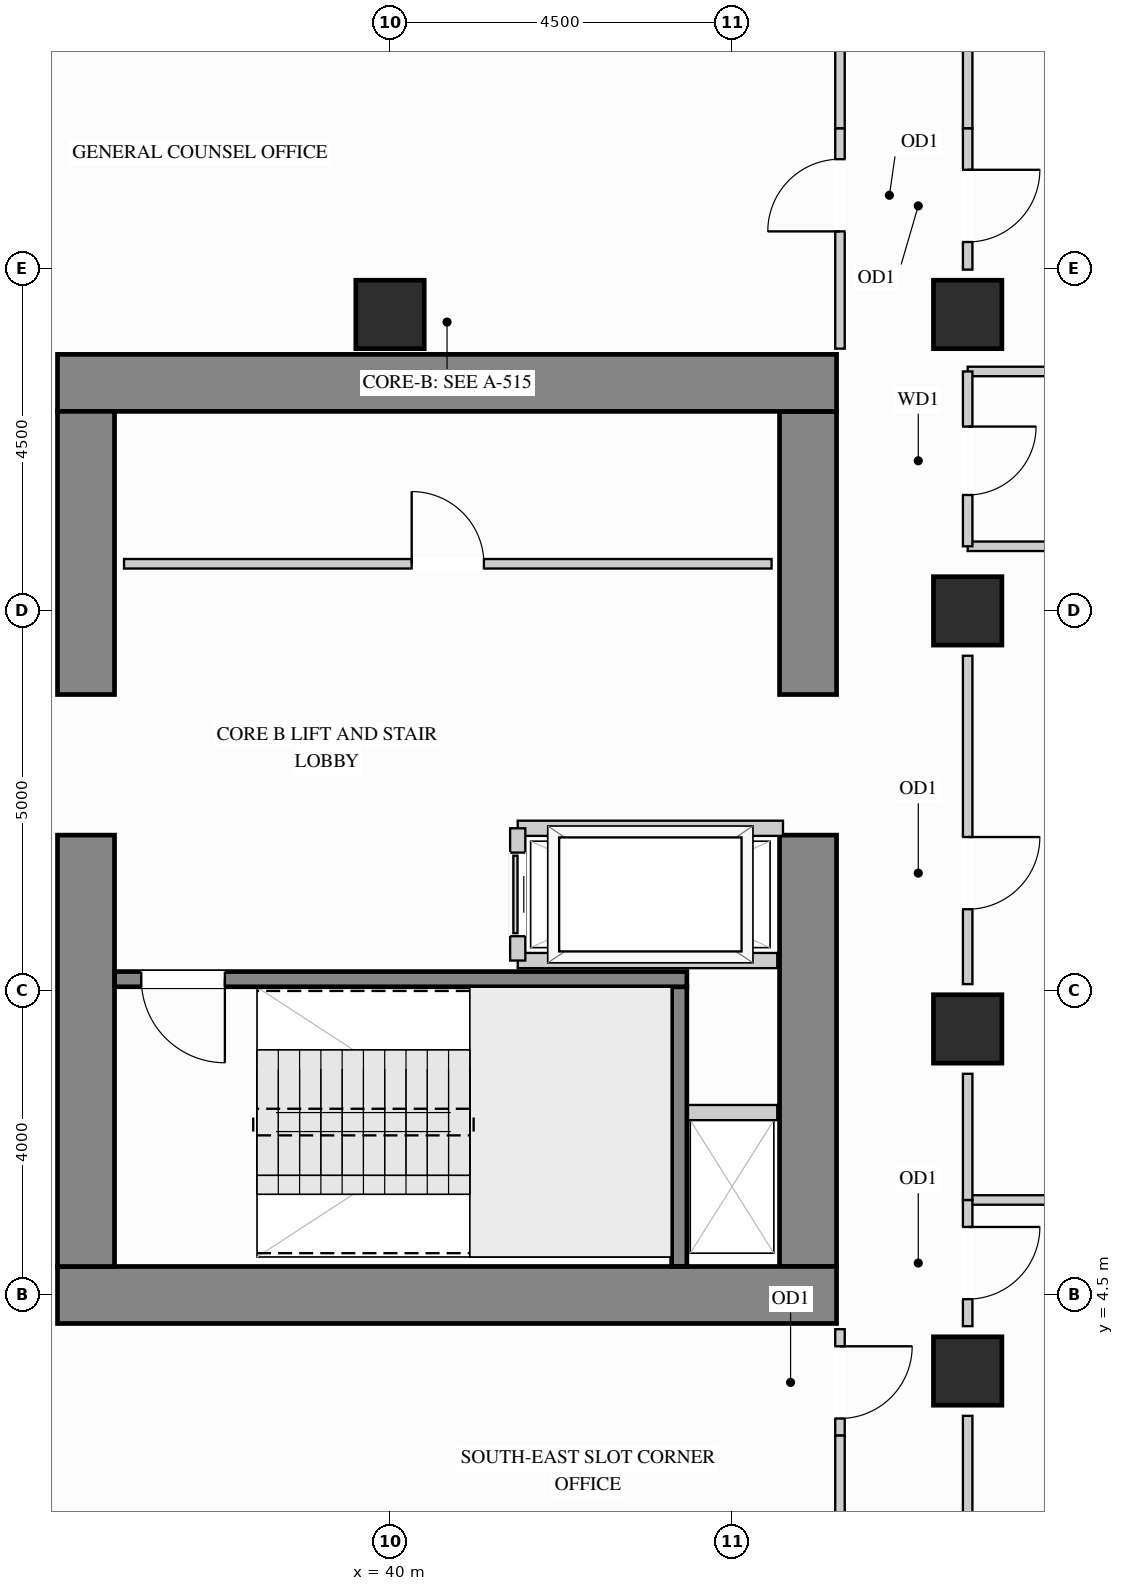
"""IFC4 building model, lengths in metres.
Left out: names, types, materials, properties, quantities, classifications, styles, units other than length and angle.
Written with IfcOpenShell. Run it as: python <this file> out.ifc"""

import sys

from ifc_helpers import new_model, si_unit, direction, frame, frame_2d, origin, origin_2d, place, context, subcontext, project, spatial, rectangle, extrude, source, transform, mapped, element, fill, save


model = new_model("IFC4")
c1 = context("Model", 3, precision=1e-05, world=origin(), true_north=direction((0.0, 1.0)))
c2 = subcontext(c1, "Body", "Model", "MODEL_VIEW")
j1 = project(units=[si_unit("LENGTHUNIT", "METRE"), si_unit("PLANEANGLEUNIT", "RADIAN")], contexts=[c1])
p1 = place(None, origin())
s1 = spatial("IfcSite", under=j1, at=p1, CompositionType="ELEMENT")
p2 = place(p1, origin())
s2 = spatial("IfcBuilding", under=s1, at=p2, CompositionType="ELEMENT")
p3 = place(p2, frame((0.0, 0.0, 113.4)))
s3 = spatial("IfcBuildingStorey", under=s2, at=p3, CompositionType="ELEMENT", Elevation=113.4)
m1 = source(origin(), c2, "Body", "SweptSolid", [
    extrude(rectangle(XDim=0.9, YDim=0.9, at=origin_2d()), origin(), (0.0, 0.0, 1.0), 3.38),
])
for number, where, z_axis, x_axis in (
    (1, (47.6, 13.5, 0.0), (0.0, 0.0, 1.0), (1.0, 0.0, 0.0)),
    (2, (47.6, 3.5, 0.0), (0.0, 0.0, 1.0), (1.0, 0.0, 0.0)),
    (3, (47.6, 8.0, 0.0), (0.0, 0.0, 1.0), (1.0, 0.0, 0.0)),
    (4, (40.0, 17.4, 0.0), (0.0, 0.0, 1.0), (1.0, 0.0, 0.0)),
    (5, (47.6, 17.4, 0.0), (0.0, 0.0, 1.0), (1.0, 0.0, 0.0)),
):
    element("IfcColumn", number, at=place(p3, frame(where, z_axis=z_axis, x_axis=x_axis)), inside=s3, PredefinedType="COLUMN", context=c2, shape_type="MappedRepresentation", body=[
        mapped(m1, transform((0.0, 0.0, 0.0), x_axis=(1.0, 0.0, 0.0), y_axis=(0.0, 1.0, 0.0), z_axis=(0.0, 0.0, 1.0))),
    ])
m2 = source(origin(), c2, "Body", "SweptSolid", [
    extrude(rectangle(XDim=5.675, YDim=0.75, at=frame_2d((2.837, 0.0))), origin(), (0.0, 0.0, 1.0), 3.38),
])
p4 = place(p3, frame((45.5, 4.875, 0.0), z_axis=(0.0, 0.0, 1.0), x_axis=(0.0, 1.0, 0.0)))
e6 = element("IfcWall", 6, at=p4, inside=s3, PredefinedType="SHEAR", context=c2, shape_type="MappedRepresentation", body=[
    mapped(m2, transform((0.0, 0.0, 0.0), x_axis=(1.0, 0.0, 0.0), y_axis=(0.0, 1.0, 0.0), z_axis=(0.0, 0.0, 1.0))),
])
m3 = source(origin(), c2, "Body", "SweptSolid", [
    extrude(rectangle(XDim=3.725, YDim=0.75, at=frame_2d((1.863, 0.0))), origin(), (0.0, 0.0, 1.0), 3.38),
])
p5 = place(p3, frame((45.5, 12.4, 0.0), z_axis=(0.0, 0.0, 1.0), x_axis=(0.0, 1.0, 0.0)))
e7 = element("IfcWall", 7, at=p5, inside=s3, PredefinedType="SHEAR", context=c2, shape_type="MappedRepresentation", body=[
    mapped(m3, transform((0.0, 0.0, 0.0), x_axis=(1.0, 0.0, 0.0), y_axis=(0.0, 1.0, 0.0), z_axis=(0.0, 0.0, 1.0))),
])
m4 = source(origin(), c2, "Body", "SweptSolid", [
    extrude(rectangle(XDim=10.25, YDim=0.75, at=frame_2d((5.125, 0.0))), origin(), (0.0, 0.0, 1.0), 3.38),
])
for number, where, z_axis, x_axis in (
    (8, (35.625, 16.5, 0.0), (0.0, 0.0, 1.0), (1.0, 0.0, 0.0)),
    (9, (35.625, 4.5, 0.0), (0.0, 0.0, 1.0), (1.0, 0.0, 0.0)),
):
    element("IfcWall", number, at=place(p3, frame(where, z_axis=z_axis, x_axis=x_axis)), inside=s3, PredefinedType="SHEAR", context=c2, shape_type="MappedRepresentation", body=[
        mapped(m4, transform((0.0, 0.0, 0.0), x_axis=(1.0, 0.0, 0.0), y_axis=(0.0, 1.0, 0.0), z_axis=(0.0, 0.0, 1.0))),
    ])
p6 = place(p3, frame((36.0, 4.875, 0.0), z_axis=(0.0, 0.0, 1.0), x_axis=(0.0, 1.0, 0.0)))
e10 = element("IfcWall", 10, at=p6, inside=s3, PredefinedType="SHEAR", context=c2, shape_type="MappedRepresentation", body=[
    mapped(m2, transform((0.0, 0.0, 0.0), x_axis=(1.0, 0.0, 0.0), y_axis=(0.0, 1.0, 0.0), z_axis=(0.0, 0.0, 1.0))),
])
p7 = place(p3, frame((36.0, 12.4, 0.0), z_axis=(0.0, 0.0, 1.0), x_axis=(0.0, 1.0, 0.0)))
e11 = element("IfcWall", 11, at=p7, inside=s3, PredefinedType="SHEAR", context=c2, shape_type="MappedRepresentation", body=[
    mapped(m3, transform((0.0, 0.0, 0.0), x_axis=(1.0, 0.0, 0.0), y_axis=(0.0, 1.0, 0.0), z_axis=(0.0, 0.0, 1.0))),
])
p8 = place(p3, frame((36.5, 14.12, 0.0), z_axis=(0.0, 0.0, 1.0), x_axis=(1.0, 0.0, 0.0)))
e12 = element("IfcWall", 12, at=p8, inside=s3, PredefinedType="PARTITIONING", context=c2, shape_type="SweptSolid", body=[
    extrude(rectangle(XDim=8.52, YDim=0.125, at=frame_2d((4.26, 0.0))), origin(), (0.0, 0.0, 1.0), 3.365),
])
p9 = place(p8, frame((3.785, 0.0, 0.0)))
e13 = element("IfcOpeningElement", 13, at=p9, cuts=e12, PredefinedType="OPENING", context=c2, shape_type="SweptSolid", body=[
    extrude(rectangle(XDim=0.95, YDim=2.15, at=frame_2d((0.475, 1.075))), frame((0.0, 0.073, 0.0), z_axis=(0.0, -1.0, 0.0), x_axis=(1.0, 0.0, 0.0)), (0.0, 0.0, 1.0), 0.145),
])
m5 = source(origin(), c2, "Body", "SweptSolid", [
    extrude(rectangle(XDim=8.048, YDim=0.125, at=frame_2d((4.024, 0.0))), origin(), (0.0, 0.0, 1.0), 3.365),
])
p10 = place(p3, frame((47.6, 14.35, 0.0), z_axis=(0.0, 0.0, 1.0), x_axis=(1.0, 0.0, 0.0)))
e14 = element("IfcWall", 14, at=p10, inside=s3, PredefinedType="PARTITIONING", context=c2, shape_type="MappedRepresentation", body=[
    mapped(m5, transform((0.0, 0.0, 0.0), x_axis=(1.0, 0.0, 0.0), y_axis=(0.0, 1.0, 0.0), z_axis=(0.0, 0.0, 1.0))),
])
m6 = source(origin(), c2, "Body", "SweptSolid", [
    extrude(rectangle(XDim=8.048, YDim=0.125, at=frame_2d((4.024, 0.0))), origin(), (0.0, 0.0, 1.0), 2.677),
])
p11 = place(p3, frame((47.6, 16.65, 0.0), z_axis=(0.0, 0.0, 1.0), x_axis=(1.0, 0.0, 0.0)))
e15 = element("IfcWall", 15, at=p11, inside=s3, PredefinedType="PARTITIONING", context=c2, shape_type="MappedRepresentation", body=[
    mapped(m6, transform((0.0, 0.0, 0.0), x_axis=(1.0, 0.0, 0.0), y_axis=(0.0, 1.0, 0.0), z_axis=(0.0, 0.0, 1.0))),
])
p12 = place(p3, frame((47.6, 5.75, 0.0), z_axis=(0.0, 0.0, 1.0), x_axis=(1.0, 0.0, 0.0)))
e16 = element("IfcWall", 16, at=p12, inside=s3, PredefinedType="PARTITIONING", context=c2, shape_type="MappedRepresentation", body=[
    mapped(m5, transform((0.0, 0.0, 0.0), x_axis=(1.0, 0.0, 0.0), y_axis=(0.0, 1.0, 0.0), z_axis=(0.0, 0.0, 1.0))),
])
p13 = place(p3, frame((47.6, 4.09, 0.0), z_axis=(0.0, 0.0, 1.0), x_axis=(0.0, 1.0, 0.0)))
e17 = element("IfcWall", 17, at=p13, inside=s3, PredefinedType="PARTITIONING", context=c2, shape_type="SweptSolid", body=[
    extrude(rectangle(XDim=1.66, YDim=0.125, at=frame_2d((0.83, 0.0))), origin(), (0.0, 0.0, 1.0), 2.677),
])
p14 = place(p13, frame((0.355, 0.0, 0.0)))
e18 = element("IfcOpeningElement", 18, at=p14, cuts=e17, PredefinedType="OPENING", context=c2, shape_type="SweptSolid", body=[
    extrude(rectangle(XDim=0.95, YDim=2.15, at=frame_2d((0.475, 1.075))), frame((0.0, 0.073, 0.0), z_axis=(0.0, -1.0, 0.0), x_axis=(1.0, 0.0, 0.0)), (0.0, 0.0, 1.0), 0.145),
])
m7 = source(origin(), c2, "Body", "SweptSolid", [
    extrude(rectangle(XDim=1.72, YDim=0.125, at=frame_2d((0.86, 0.0))), origin(), (0.0, 0.0, 1.0), 2.677),
])
p15 = place(p3, frame((47.6, 1.19, 0.0), z_axis=(0.0, 0.0, 1.0), x_axis=(0.0, 1.0, 0.0)))
e19 = element("IfcWall", 19, at=p15, inside=s3, PredefinedType="PARTITIONING", context=c2, shape_type="MappedRepresentation", body=[
    mapped(m7, transform((0.0, 0.0, 0.0), x_axis=(1.0, 0.0, 0.0), y_axis=(0.0, 1.0, 0.0), z_axis=(0.0, 0.0, 1.0))),
])
m8 = source(origin(), c2, "Body", "SweptSolid", [
    extrude(rectangle(XDim=1.66, YDim=0.125, at=frame_2d((0.83, 0.0))), origin(), (0.0, 0.0, 1.0), 2.677),
])
p16 = place(p3, frame((47.6, 5.75, 0.0), z_axis=(0.0, 0.0, 1.0), x_axis=(0.0, 1.0, 0.0)))
e20 = element("IfcWall", 20, at=p16, inside=s3, PredefinedType="PARTITIONING", context=c2, shape_type="MappedRepresentation", body=[
    mapped(m8, transform((0.0, 0.0, 0.0), x_axis=(1.0, 0.0, 0.0), y_axis=(0.0, 1.0, 0.0), z_axis=(0.0, 0.0, 1.0))),
])
p17 = place(p3, frame((47.6, 8.59, 0.0), z_axis=(0.0, 0.0, 1.0), x_axis=(0.0, 1.0, 0.0)))
e21 = element("IfcWall", 21, at=p17, inside=s3, PredefinedType="PARTITIONING", context=c2, shape_type="SweptSolid", body=[
    extrude(rectangle(XDim=4.32, YDim=0.125, at=frame_2d((2.16, 0.0))), origin(), (0.0, 0.0, 1.0), 2.677),
])
p18 = place(p17, frame((0.985, 0.0, 0.0)))
e22 = element("IfcOpeningElement", 22, at=p18, cuts=e21, PredefinedType="OPENING", context=c2, shape_type="SweptSolid", body=[
    extrude(rectangle(XDim=0.95, YDim=2.15, at=frame_2d((0.475, 1.075))), frame((0.0, 0.073, 0.0), z_axis=(0.0, -1.0, 0.0), x_axis=(1.0, 0.0, 0.0)), (0.0, 0.0, 1.0), 0.145),
])
p19 = place(p3, frame((47.6, 17.99, 0.0), z_axis=(0.0, 0.0, 1.0), x_axis=(0.0, 1.0, 0.0)))
e23 = element("IfcWall", 23, at=p19, inside=s3, PredefinedType="PARTITIONING", context=c2, shape_type="SweptSolid", body=[
    extrude(rectangle(XDim=1.86, YDim=0.125, at=frame_2d((0.93, 0.0))), origin(), (0.0, 0.0, 1.0), 2.677),
])
p20 = place(p19, frame((0.363, 0.0, 0.0)))
e24 = element("IfcOpeningElement", 24, at=p20, cuts=e23, PredefinedType="OPENING", context=c2, shape_type="SweptSolid", body=[
    extrude(rectangle(XDim=0.95, YDim=2.15, at=frame_2d((0.475, 1.075))), frame((0.0, 0.073, 0.0), z_axis=(0.0, -1.0, 0.0), x_axis=(1.0, 0.0, 0.0)), (0.0, 0.0, 1.0), 0.145),
])
m9 = source(origin(), c2, "Body", "SweptSolid", [
    extrude(rectangle(XDim=1.46, YDim=0.125, at=frame_2d((0.73, 0.0))), origin(), (0.0, 0.0, 1.0), 2.677),
])
p21 = place(p3, frame((47.6, 19.85, 0.0), z_axis=(0.0, 0.0, 1.0), x_axis=(0.0, 1.0, 0.0)))
e25 = element("IfcWall", 25, at=p21, inside=s3, PredefinedType="PARTITIONING", context=c2, shape_type="MappedRepresentation", body=[
    mapped(m9, transform((0.0, 0.0, 0.0), x_axis=(1.0, 0.0, 0.0), y_axis=(0.0, 1.0, 0.0), z_axis=(0.0, 0.0, 1.0))),
])
p22 = place(p3, frame((47.6, 14.35, 0.0), z_axis=(0.0, 0.0, 1.0), x_axis=(0.0, 1.0, 0.0)))
e26 = element("IfcWall", 26, at=p22, inside=s3, PredefinedType="PARTITIONING", context=c2, shape_type="SweptSolid", body=[
    extrude(rectangle(XDim=2.3, YDim=0.125, at=frame_2d((1.15, 0.0))), origin(), (0.0, 0.0, 1.0), 2.677),
])
p23 = place(p22, frame((0.675, 0.0, 0.0)))
e27 = element("IfcOpeningElement", 27, at=p23, cuts=e26, PredefinedType="OPENING", context=c2, shape_type="SweptSolid", body=[
    extrude(rectangle(XDim=0.9, YDim=2.15, at=frame_2d((0.45, 1.075))), frame((0.0, 0.073, 0.0), z_axis=(0.0, -1.0, 0.0), x_axis=(1.0, 0.0, 0.0)), (0.0, 0.0, 1.0), 0.145),
])
p24 = place(p3, frame((45.92, 16.95, 0.0), z_axis=(0.0, 0.0, 1.0), x_axis=(0.0, 1.0, 0.0)))
e28 = element("IfcWall", 28, at=p24, inside=s3, PredefinedType="PARTITIONING", context=c2, shape_type="SweptSolid", body=[
    extrude(rectangle(XDim=2.9, YDim=0.125, at=frame_2d((1.45, 0.0))), origin(), (0.0, 0.0, 1.0), 3.365),
])
p25 = place(p24, frame((1.543, 0.0, 0.0)))
e29 = element("IfcOpeningElement", 29, at=p25, cuts=e28, PredefinedType="OPENING", context=c2, shape_type="SweptSolid", body=[
    extrude(rectangle(XDim=0.95, YDim=2.15, at=frame_2d((0.475, 1.075))), frame((0.0, 0.073, 0.0), z_axis=(0.0, -1.0, 0.0), x_axis=(1.0, 0.0, 0.0)), (0.0, 0.0, 1.0), 0.145),
])
m10 = source(origin(), c2, "Body", "SweptSolid", [
    extrude(rectangle(XDim=2.298, YDim=0.125, at=frame_2d((1.149, 0.0))), origin(), (0.0, 0.0, 1.0), 3.365),
])
p26 = place(p3, frame((45.92, 19.85, 0.0), z_axis=(0.0, 0.0, 1.0), x_axis=(0.0, 1.0, 0.0)))
e30 = element("IfcWall", 30, at=p26, inside=s3, PredefinedType="PARTITIONING", context=c2, shape_type="MappedRepresentation", body=[
    mapped(m10, transform((0.0, 0.0, 0.0), x_axis=(1.0, 0.0, 0.0), y_axis=(0.0, 1.0, 0.0), z_axis=(0.0, 0.0, 1.0))),
])
p27 = place(p3, frame((45.92, 2.65, 0.0), z_axis=(0.0, 0.0, 1.0), x_axis=(0.0, 1.0, 0.0)))
e31 = element("IfcWall", 31, at=p27, inside=s3, PredefinedType="PARTITIONING", context=c2, shape_type="SweptSolid", body=[
    extrude(rectangle(XDim=1.4, YDim=0.125, at=frame_2d((0.7, 0.0))), origin(), (0.0, 0.0, 1.0), 3.365),
])
p28 = place(p27, frame((0.225, 0.0, 0.0)))
e32 = element("IfcOpeningElement", 32, at=p28, cuts=e31, PredefinedType="OPENING", context=c2, shape_type="SweptSolid", body=[
    extrude(rectangle(XDim=0.95, YDim=2.15, at=frame_2d((0.475, 1.075))), frame((0.0, 0.073, 0.0), z_axis=(0.0, -1.0, 0.0), x_axis=(1.0, 0.0, 0.0)), (0.0, 0.0, 1.0), 0.145),
])
p29 = place(p3, frame((45.92, 0.352, 0.0), z_axis=(0.0, 0.0, 1.0), x_axis=(0.0, 1.0, 0.0)))
e33 = element("IfcWall", 33, at=p29, inside=s3, PredefinedType="PARTITIONING", context=c2, shape_type="MappedRepresentation", body=[
    mapped(m10, transform((0.0, 0.0, 0.0), x_axis=(1.0, 0.0, 0.0), y_axis=(0.0, 1.0, 0.0), z_axis=(0.0, 0.0, 1.0))),
])
m11 = source(origin(), c2, "Body", "SweptSolid", [
    extrude(rectangle(XDim=1.245, YDim=0.2, at=frame_2d((0.623, 0.0))), origin(), (0.0, 0.0, 1.0), 3.365),
])
p30 = place(p3, frame((43.85, 6.9, 0.0), z_axis=(0.0, 0.0, 1.0), x_axis=(1.0, 0.0, 0.0)))
e34 = element("IfcWall", 34, at=p30, inside=s3, PredefinedType="PARTITIONING", context=c2, shape_type="MappedRepresentation", body=[
    mapped(m11, transform((0.0, 0.0, 0.0), x_axis=(1.0, 0.0, 0.0), y_axis=(0.0, 1.0, 0.0), z_axis=(0.0, 0.0, 1.0))),
])
m12 = source(origin(), c2, "Body", "SweptSolid", [
    extrude(rectangle(XDim=3.49, YDim=0.2, at=frame_2d((1.745, 0.0))), origin(), (0.0, 0.0, 1.0), 3.365),
])
p31 = place(p3, frame((41.68, 10.64, 0.0), z_axis=(0.0, 0.0, 1.0), x_axis=(1.0, 0.0, 0.0)))
e35 = element("IfcWall", 35, at=p31, inside=s3, PredefinedType="PARTITIONING", context=c2, shape_type="MappedRepresentation", body=[
    mapped(m12, transform((0.0, 0.0, 0.0), x_axis=(1.0, 0.0, 0.0), y_axis=(0.0, 1.0, 0.0), z_axis=(0.0, 0.0, 1.0))),
])
m13 = source(origin(), c2, "Body", "SweptSolid", [
    extrude(rectangle(XDim=3.415, YDim=0.2, at=frame_2d((1.708, 0.0))), origin(), (0.0, 0.0, 1.0), 3.365),
])
p32 = place(p3, frame((41.68, 8.9, 0.0), z_axis=(0.0, 0.0, 1.0), x_axis=(1.0, 0.0, 0.0)))
e36 = element("IfcWall", 36, at=p32, inside=s3, PredefinedType="PARTITIONING", context=c2, shape_type="MappedRepresentation", body=[
    mapped(m13, transform((0.0, 0.0, 0.0), x_axis=(1.0, 0.0, 0.0), y_axis=(0.0, 1.0, 0.0), z_axis=(0.0, 0.0, 1.0))),
])
p33 = place(p3, frame((41.68, 8.9, 0.0), z_axis=(0.0, 0.0, 1.0), x_axis=(0.0, 1.0, 0.0)))
e37 = element("IfcWall", 37, at=p33, inside=s3, PredefinedType="PARTITIONING", context=c2, shape_type="SweptSolid", body=[
    extrude(rectangle(XDim=1.74, YDim=0.2, at=frame_2d((0.87, 0.0))), origin(), (0.0, 0.0, 1.0), 3.365),
])
p34 = place(p33, frame((0.32, 0.0, 0.0)))
e38 = element("IfcOpeningElement", 38, at=p34, cuts=e37, PredefinedType="OPENING", context=c2, shape_type="SweptSolid", body=[
    extrude(rectangle(XDim=1.1, YDim=2.2, at=frame_2d((0.55, 1.1))), frame((0.0, 0.11, 0.0), z_axis=(0.0, -1.0, 0.0), x_axis=(1.0, 0.0, 0.0)), (0.0, 0.0, 1.0), 0.22),
])
m14 = source(origin(), c2, "Body", "SweptSolid", [
    extrude(rectangle(XDim=3.678, YDim=0.2, at=frame_2d((1.839, 0.0))), origin(), (0.0, 0.0, 1.0), 3.38),
])
p35 = place(p3, frame((43.805, 4.877, 0.0), z_axis=(0.0, 0.0, 1.0), x_axis=(0.0, 1.0, 0.0)))
e39 = element("IfcWall", 39, at=p35, inside=s3, PredefinedType="SHEAR", context=c2, shape_type="MappedRepresentation", body=[
    mapped(m14, transform((0.0, 0.0, 0.0), x_axis=(1.0, 0.0, 0.0), y_axis=(0.0, 1.0, 0.0), z_axis=(0.0, 0.0, 1.0))),
])
p36 = place(p3, frame((36.377, 8.655, 0.0), z_axis=(0.0, 0.0, 1.0), x_axis=(1.0, 0.0, 0.0)))
e40 = element("IfcWall", 40, at=p36, inside=s3, PredefinedType="SHEAR", context=c2, shape_type="SweptSolid", body=[
    extrude(rectangle(XDim=7.528, YDim=0.2, at=frame_2d((3.764, 0.0))), origin(), (0.0, 0.0, 1.0), 3.38),
])
p37 = place(p36, frame((0.35, 0.0, 0.0)))
e41 = element("IfcOpeningElement", 41, at=p37, cuts=e40, PredefinedType="OPENING", context=c2, shape_type="SweptSolid", body=[
    extrude(rectangle(XDim=1.1, YDim=2.15, at=frame_2d((0.55, 1.075))), frame((0.0, 0.11, 0.0), z_axis=(0.0, -1.0, 0.0), x_axis=(1.0, 0.0, 0.0)), (0.0, 0.0, 1.0), 0.22),
])
m15 = source(origin(), c2, "Body", "SweptSolid", [
    extrude(rectangle(XDim=1.1, YDim=2.2, at=frame_2d((0.55, 1.1))), frame((0.0, 0.025, 0.0), z_axis=(0.0, -1.0, 0.0), x_axis=(1.0, 0.0, 0.0)), (0.0, 0.0, 1.0), 0.05),
])
p38 = place(p34, origin())
e42 = element("IfcDoor", 42, at=p38, inside=s3, OperationType="SLIDING_TO_LEFT", PredefinedType="DOOR", context=c2, shape_type="MappedRepresentation", body=[
    mapped(m15, transform((0.0, 0.0, 0.0), x_axis=(1.0, 0.0, 0.0), y_axis=(0.0, 1.0, 0.0), z_axis=(0.0, 0.0, 1.0))),
])
fill(e38, e42)
m16 = source(origin(), c2, "Body", "SweptSolid", [
    extrude(rectangle(XDim=0.95, YDim=2.15, at=frame_2d((0.475, 1.075))), frame((0.0, 0.025, 0.0), z_axis=(0.0, -1.0, 0.0), x_axis=(1.0, 0.0, 0.0)), (0.0, 0.0, 1.0), 0.05),
])
p39 = place(p9, origin())
e43 = element("IfcDoor", 43, at=p39, inside=s3, OperationType="SINGLE_SWING_LEFT", PredefinedType="DOOR", context=c2, shape_type="MappedRepresentation", body=[
    mapped(m16, transform((0.0, 0.0, 0.0), x_axis=(1.0, 0.0, 0.0), y_axis=(0.0, 1.0, 0.0), z_axis=(0.0, 0.0, 1.0))),
])
fill(e13, e43)
p40 = place(p25, origin())
e44 = element("IfcDoor", 44, at=p40, inside=s3, OperationType="SINGLE_SWING_LEFT", PredefinedType="DOOR", context=c2, shape_type="MappedRepresentation", body=[
    mapped(m16, transform((0.0, 0.0, 0.0), x_axis=(1.0, 0.0, 0.0), y_axis=(0.0, 1.0, 0.0), z_axis=(0.0, 0.0, 1.0))),
])
fill(e29, e44)
p41 = place(p28, origin())
e45 = element("IfcDoor", 45, at=p41, inside=s3, OperationType="SINGLE_SWING_RIGHT", PredefinedType="DOOR", context=c2, shape_type="MappedRepresentation", body=[
    mapped(m16, transform((0.0, 0.0, 0.0), x_axis=(1.0, 0.0, 0.0), y_axis=(0.0, 1.0, 0.0), z_axis=(0.0, 0.0, 1.0))),
])
fill(e32, e45)
p42 = place(p14, origin())
e46 = element("IfcDoor", 46, at=p42, inside=s3, OperationType="SINGLE_SWING_RIGHT", PredefinedType="DOOR", context=c2, shape_type="MappedRepresentation", body=[
    mapped(m16, transform((0.0, 0.0, 0.0), x_axis=(1.0, 0.0, 0.0), y_axis=(0.0, 1.0, 0.0), z_axis=(0.0, 0.0, 1.0))),
])
fill(e18, e46)
p43 = place(p18, origin())
e47 = element("IfcDoor", 47, at=p43, inside=s3, OperationType="SINGLE_SWING_RIGHT", PredefinedType="DOOR", context=c2, shape_type="MappedRepresentation", body=[
    mapped(m16, transform((0.0, 0.0, 0.0), x_axis=(1.0, 0.0, 0.0), y_axis=(0.0, 1.0, 0.0), z_axis=(0.0, 0.0, 1.0))),
])
fill(e22, e47)
p44 = place(p20, origin())
e48 = element("IfcDoor", 48, at=p44, inside=s3, OperationType="SINGLE_SWING_RIGHT", PredefinedType="DOOR", context=c2, shape_type="MappedRepresentation", body=[
    mapped(m16, transform((0.0, 0.0, 0.0), x_axis=(1.0, 0.0, 0.0), y_axis=(0.0, 1.0, 0.0), z_axis=(0.0, 0.0, 1.0))),
])
fill(e24, e48)
m17 = source(origin(), c2, "Body", "SweptSolid", [
    extrude(rectangle(XDim=1.1, YDim=2.15, at=frame_2d((0.55, 1.075))), frame((0.0, 0.025, 0.0), z_axis=(0.0, -1.0, 0.0), x_axis=(1.0, 0.0, 0.0)), (0.0, 0.0, 1.0), 0.05),
])
p45 = place(p37, origin())
e49 = element("IfcDoor", 49, at=p45, inside=s3, OperationType="SINGLE_SWING_RIGHT", PredefinedType="DOOR", context=c2, shape_type="MappedRepresentation", body=[
    mapped(m17, transform((0.0, 0.0, 0.0), x_axis=(1.0, 0.0, 0.0), y_axis=(0.0, 1.0, 0.0), z_axis=(0.0, 0.0, 1.0))),
])
fill(e41, e49)
m18 = source(origin(), c2, "Body", "SweptSolid", [
    extrude(rectangle(XDim=0.9, YDim=2.15, at=frame_2d((0.45, 1.075))), frame((0.0, 0.025, 0.0), z_axis=(0.0, -1.0, 0.0), x_axis=(1.0, 0.0, 0.0)), (0.0, 0.0, 1.0), 0.05),
])
p46 = place(p23, origin())
e50 = element("IfcDoor", 50, at=p46, inside=s3, OperationType="SINGLE_SWING_RIGHT", PredefinedType="DOOR", context=c2, shape_type="MappedRepresentation", body=[
    mapped(m18, transform((0.0, 0.0, 0.0), x_axis=(1.0, 0.0, 0.0), y_axis=(0.0, 1.0, 0.0), z_axis=(0.0, 0.0, 1.0))),
])
fill(e27, e50)
save(model, sys.argv[1])
